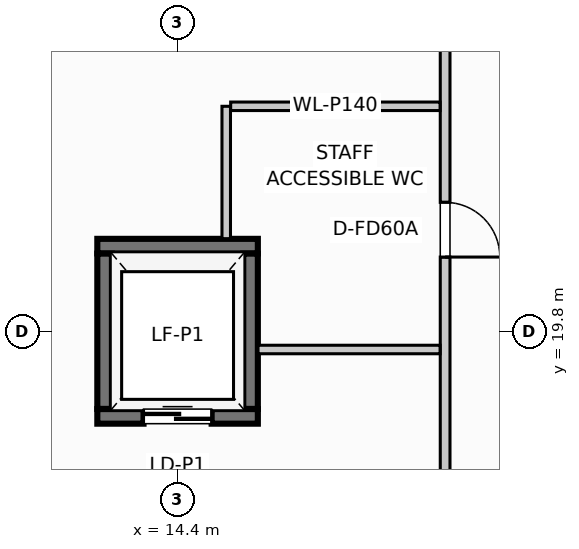
"""IFC4 building model, lengths in metres.
Left out: names, types, materials, properties, quantities, classifications, styles, units other than length and angle.
Written with IfcOpenShell. Run it as: python <this file> out.ifc"""

import sys

from ifc_helpers import new_model, si_unit, direction, frame, frame_2d, origin, place, context, subcontext, project, spatial, rectangle, extrude, element, fill, save


model = new_model("IFC4")
c1 = context("Model", 3, precision=1e-05, world=origin(), true_north=direction((0.0, 1.0)))
c2 = subcontext(c1, "Body", "Model", "MODEL_VIEW")
j1 = project(units=[si_unit("LENGTHUNIT", "METRE"), si_unit("PLANEANGLEUNIT", "RADIAN")], contexts=[c1])
p1 = place(None, origin())
s1 = spatial("IfcSite", under=j1, at=p1, CompositionType="ELEMENT")
p2 = place(p1, origin())
s2 = spatial("IfcBuilding", under=s1, at=p2, CompositionType="ELEMENT")
p3 = place(p2, frame((0.0, 0.0, -5.4)))
s3 = spatial("IfcBuildingStorey", under=s2, at=p3, CompositionType="ELEMENT", Elevation=-5.4)
p4 = place(p3, frame((13.08, 18.4, 0.0), z_axis=(0.0, 0.0, 1.0), x_axis=(1.0, 0.0, 0.0)))
e1 = element("IfcWall", 1, at=p4, inside=s3, PredefinedType="SHEAR", context=c2, shape_type="SweptSolid", body=[
    extrude(rectangle(XDim=2.64, YDim=0.24, at=frame_2d((1.32, 0.0))), origin(), (0.0, 0.0, 1.0), 5.4),
])
p5 = place(p4, frame((0.76, 0.0, 0.0)))
e2 = element("IfcOpeningElement", 2, at=p5, cuts=e1, PredefinedType="OPENING", context=c2, shape_type="SweptSolid", body=[
    extrude(rectangle(XDim=1.12, YDim=2.0, at=frame_2d((0.56, 1.0))), frame((0.0, 0.13, 0.0), z_axis=(0.0, -1.0, 0.0), x_axis=(1.0, 0.0, 0.0)), (0.0, 0.0, 1.0), 0.26),
])
p6 = place(p3, frame((15.72, 21.2, 0.0), z_axis=(0.0, 0.0, 1.0), x_axis=(-1.0, 0.0, 0.0)))
e3 = element("IfcWall", 3, at=p6, inside=s3, PredefinedType="SHEAR", context=c2, shape_type="SweptSolid", body=[
    extrude(rectangle(XDim=2.64, YDim=0.24, at=frame_2d((1.32, 0.0))), origin(), (0.0, 0.0, 1.0), 5.4),
])
for number, where, z_axis, x_axis in (
    (4, (13.2, 18.523, 0.0), (0.0, 0.0, 1.0), (0.0, 1.0, 0.0)),
    (5, (15.6, 18.523, 0.0), (0.0, 0.0, 1.0), (0.0, 1.0, 0.0)),
):
    element("IfcWall", number, at=place(p3, frame(where, z_axis=z_axis, x_axis=x_axis)), inside=s3, PredefinedType="SHEAR", context=c2, shape_type="SweptSolid", body=[
        extrude(rectangle(XDim=2.554, YDim=0.24, at=frame_2d((1.277, 0.0))), origin(), (0.0, 0.0, 1.0), 5.4),
    ])
p7 = place(p3, frame((18.8, 4.5, 0.0), z_axis=(0.0, 0.0, 1.0), x_axis=(0.0, 1.0, 0.0)))
e6 = element("IfcWall", 6, at=p7, inside=s3, PredefinedType="PARTITIONING", context=c2, shape_type="SweptSolid", body=[
    extrude(rectangle(XDim=33.5, YDim=0.16, at=frame_2d((16.75, 0.0))), origin(), (0.0, 0.0, 1.0), 5.085),
])
p8 = place(p7, frame((11.069, 0.0, 0.0)))
e7 = element("IfcOpeningElement", 7, at=p8, cuts=e6, PredefinedType="OPENING", context=c2, shape_type="SweptSolid", body=[
    extrude(rectangle(XDim=0.9, YDim=2.0, at=frame_2d((0.45, 1.0))), frame((0.0, 0.09, 0.0), z_axis=(0.0, -1.0, 0.0), x_axis=(1.0, 0.0, 0.0)), (0.0, 0.0, 1.0), 0.18),
])
p9 = place(p7, frame((16.521, 0.0, 0.0)))
e8 = element("IfcOpeningElement", 8, at=p9, cuts=e6, PredefinedType="OPENING", context=c2, shape_type="SweptSolid", body=[
    extrude(rectangle(XDim=0.9, YDim=2.0, at=frame_2d((0.45, 1.0))), frame((0.0, 0.09, 0.0), z_axis=(0.0, -1.0, 0.0), x_axis=(1.0, 0.0, 0.0)), (0.0, 0.0, 1.0), 0.18),
])
p10 = place(p3, frame((15.723, 19.5, 0.0), z_axis=(0.0, 0.0, 1.0), x_axis=(1.0, 0.0, 0.0)))
e9 = element("IfcWall", 9, at=p10, inside=s3, PredefinedType="PARTITIONING", context=c2, shape_type="SweptSolid", body=[
    extrude(rectangle(XDim=2.994, YDim=0.14, at=frame_2d((1.497, 0.0))), origin(), (0.0, 0.0, 1.0), 5.085),
])
p11 = place(p3, frame((15.2, 21.323, 0.0), z_axis=(0.0, 0.0, 1.0), x_axis=(0.0, 1.0, 0.0)))
e10 = element("IfcWall", 10, at=p11, inside=s3, PredefinedType="PARTITIONING", context=c2, shape_type="SweptSolid", body=[
    extrude(rectangle(XDim=2.177, YDim=0.14, at=frame_2d((1.088, 0.0))), origin(), (0.0, 0.0, 1.0), 5.085),
])
p12 = place(p3, frame((15.273, 23.5, 0.0), z_axis=(0.0, 0.0, 1.0), x_axis=(1.0, 0.0, 0.0)))
e11 = element("IfcWall", 11, at=p12, inside=s3, PredefinedType="PARTITIONING", context=c2, shape_type="SweptSolid", body=[
    extrude(rectangle(XDim=3.444, YDim=0.14, at=frame_2d((1.722, 0.0))), origin(), (0.0, 0.0, 1.0), 5.085),
])
p13 = place(p5, origin())
e12 = element("IfcDoor", 12, at=p13, inside=s3, OperationType="DOUBLE_DOOR_SLIDING", PredefinedType="USERDEFINED", context=c2, shape_type="SweptSolid", body=[
    extrude(rectangle(XDim=1.12, YDim=2.0, at=frame_2d((0.56, 1.0))), frame((0.0, 0.025, 0.0), z_axis=(0.0, -1.0, 0.0), x_axis=(1.0, 0.0, 0.0)), (0.0, 0.0, 1.0), 0.05),
])
fill(e2, e12)
p14 = place(p9, frame((0.9, 0.0, 0.0), z_axis=(0.0, 0.0, 1.0), x_axis=(-1.0, 0.0, 0.0)))
e13 = element("IfcDoor", 13, at=p14, inside=s3, OperationType="SINGLE_SWING_RIGHT", PredefinedType="DOOR", context=c2, shape_type="SweptSolid", body=[
    extrude(rectangle(XDim=0.9, YDim=2.0, at=frame_2d((0.45, 1.0))), frame((0.0, 0.025, 0.0), z_axis=(0.0, -1.0, 0.0), x_axis=(1.0, 0.0, 0.0)), (0.0, 0.0, 1.0), 0.05),
])
fill(e8, e13)
save(model, sys.argv[1])
